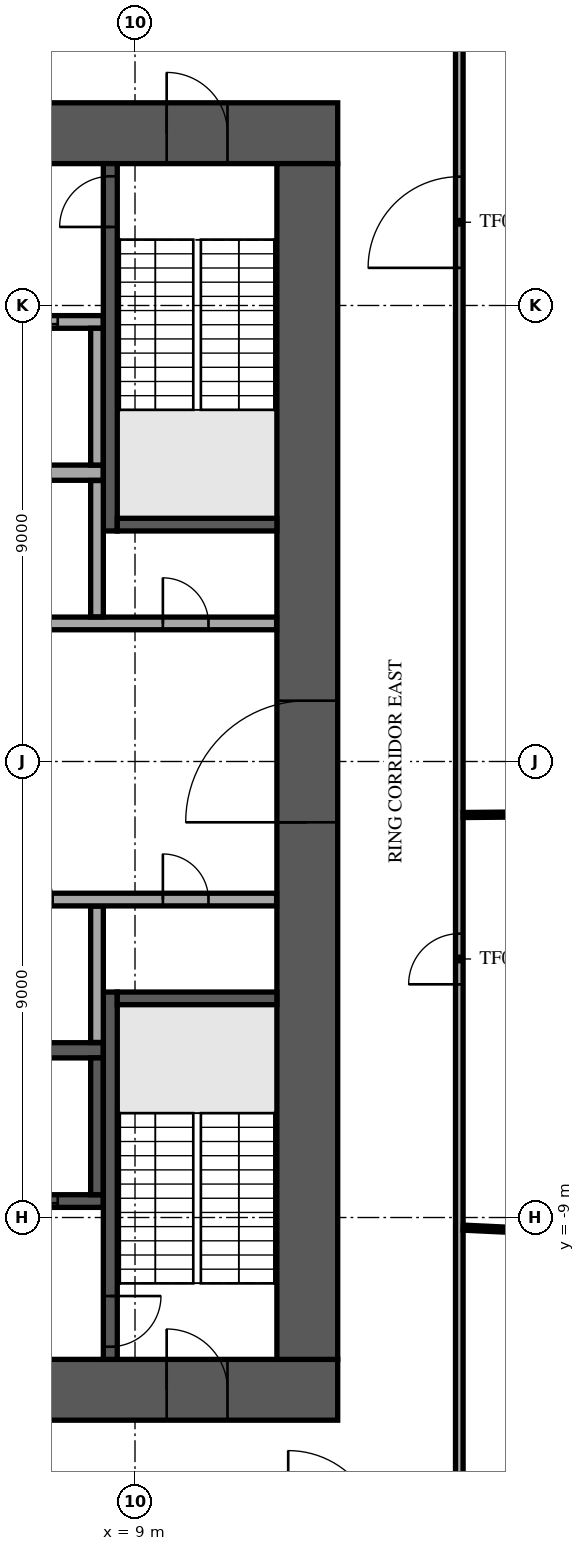
"""IFC4 building model, lengths in metres.
Left out: names, types, materials, properties, quantities, classifications, styles, units other than length and angle.
Written with IfcOpenShell. Run it as: python <this file> out.ifc"""

import sys

from ifc_helpers import new_model, si_unit, direction, frame, frame_2d, origin, place, context, subcontext, project, spatial, rectangle, extrude, element, fill, save


model = new_model("IFC4")
c1 = context("Model", 3, precision=1e-05, world=origin(), true_north=direction((0.0, 1.0)))
c2 = subcontext(c1, "Body", "Model", "MODEL_VIEW")
j1 = project(units=[si_unit("LENGTHUNIT", "METRE"), si_unit("PLANEANGLEUNIT", "RADIAN")], contexts=[c1])
p1 = place(None, origin())
s1 = spatial("IfcSite", under=j1, at=p1, CompositionType="ELEMENT")
p2 = place(p1, origin())
s2 = spatial("IfcBuilding", under=s1, at=p2, CompositionType="ELEMENT")
p3 = place(p2, frame((0.0, 0.0, 27.3)))
s3 = spatial("IfcBuildingStorey", under=s2, at=p3, CompositionType="ELEMENT", Elevation=27.3)
p4 = place(p3, frame((-13.0, 12.4, 0.0), z_axis=(0.0, 0.0, 1.0), x_axis=(1.0, 0.0, 0.0)))
e1 = element("IfcWall", 1, at=p4, inside=s3, PredefinedType="SHEAR", context=c2, shape_type="SweptSolid", body=[
    extrude(rectangle(XDim=26.0, YDim=1.2, at=frame_2d((13.0, 0.0))), origin(), (0.0, 0.0, 1.0), 4.35),
])
p5 = place(p4, frame((11.8, 0.0, 0.0)))
e2 = element("IfcOpeningElement", 2, at=p5, cuts=e1, PredefinedType="OPENING", context=c2, shape_type="SweptSolid", body=[
    extrude(rectangle(XDim=2.4, YDim=2.4, at=frame_2d((1.2, 1.2))), frame((0.0, 0.61, 0.0), z_axis=(0.0, -1.0, 0.0), x_axis=(1.0, 0.0, 0.0)), (0.0, 0.0, 1.0), 1.22),
])
p6 = place(p4, frame((22.625, 0.0, 0.0)))
e3 = element("IfcOpeningElement", 3, at=p6, cuts=e1, PredefinedType="OPENING", context=c2, shape_type="SweptSolid", body=[
    extrude(rectangle(XDim=1.2, YDim=2.1, at=frame_2d((0.6, 1.05))), frame((0.0, 0.61, 0.0), z_axis=(0.0, -1.0, 0.0), x_axis=(1.0, 0.0, 0.0)), (0.0, 0.0, 1.0), 1.22),
])
p7 = place(p4, frame((1.6, 0.0, 0.0)))
e4 = element("IfcOpeningElement", 4, at=p7, cuts=e1, PredefinedType="OPENING", context=c2, shape_type="SweptSolid", body=[
    extrude(rectangle(XDim=1.0, YDim=2.1, at=frame_2d((0.5, 1.05))), frame((0.0, 0.61, 0.0), z_axis=(0.0, -1.0, 0.0), x_axis=(1.0, 0.0, 0.0)), (0.0, 0.0, 1.0), 1.22),
])
p8 = place(p3, frame((-13.0, -12.4, 0.0), z_axis=(0.0, 0.0, 1.0), x_axis=(1.0, 0.0, 0.0)))
e5 = element("IfcWall", 5, at=p8, inside=s3, PredefinedType="SHEAR", context=c2, shape_type="SweptSolid", body=[
    extrude(rectangle(XDim=26.0, YDim=1.2, at=frame_2d((13.0, 0.0))), origin(), (0.0, 0.0, 1.0), 4.35),
])
p9 = place(p8, frame((7.9, 0.0, 0.0)))
e6 = element("IfcOpeningElement", 6, at=p9, cuts=e5, PredefinedType="OPENING", context=c2, shape_type="SweptSolid", body=[
    extrude(rectangle(XDim=2.0, YDim=2.1, at=frame_2d((1.0, 1.05))), frame((0.0, 0.61, 0.0), z_axis=(0.0, -1.0, 0.0), x_axis=(1.0, 0.0, 0.0)), (0.0, 0.0, 1.0), 1.22),
])
p10 = place(p8, frame((18.025, 0.0, 0.0)))
e7 = element("IfcOpeningElement", 7, at=p10, cuts=e5, PredefinedType="OPENING", context=c2, shape_type="SweptSolid", body=[
    extrude(rectangle(XDim=1.2, YDim=2.1, at=frame_2d((0.6, 1.05))), frame((0.0, 0.61, 0.0), z_axis=(0.0, -1.0, 0.0), x_axis=(1.0, 0.0, 0.0)), (0.0, 0.0, 1.0), 1.22),
])
p11 = place(p8, frame((2.175, 0.0, 0.0)))
e8 = element("IfcOpeningElement", 8, at=p11, cuts=e5, PredefinedType="OPENING", context=c2, shape_type="SweptSolid", body=[
    extrude(rectangle(XDim=1.2, YDim=2.1, at=frame_2d((0.6, 1.05))), frame((0.0, 0.61, 0.0), z_axis=(0.0, -1.0, 0.0), x_axis=(1.0, 0.0, 0.0)), (0.0, 0.0, 1.0), 1.22),
])
p12 = place(p8, frame((22.625, 0.0, 0.0)))
e9 = element("IfcOpeningElement", 9, at=p12, cuts=e5, PredefinedType="OPENING", context=c2, shape_type="SweptSolid", body=[
    extrude(rectangle(XDim=1.2, YDim=2.1, at=frame_2d((0.6, 1.05))), frame((0.0, 0.61, 0.0), z_axis=(0.0, -1.0, 0.0), x_axis=(1.0, 0.0, 0.0)), (0.0, 0.0, 1.0), 1.22),
])
p13 = place(p3, frame((12.4, -11.8, 0.0), z_axis=(0.0, 0.0, 1.0), x_axis=(0.0, 1.0, 0.0)))
e10 = element("IfcWall", 10, at=p13, inside=s3, PredefinedType="SHEAR", context=c2, shape_type="SweptSolid", body=[
    extrude(rectangle(XDim=23.6, YDim=1.2, at=frame_2d((11.8, 0.0))), origin(), (0.0, 0.0, 1.0), 4.35),
])
p14 = place(p13, frame((10.6, 0.0, 0.0)))
e11 = element("IfcOpeningElement", 11, at=p14, cuts=e10, PredefinedType="OPENING", context=c2, shape_type="SweptSolid", body=[
    extrude(rectangle(XDim=2.4, YDim=2.4, at=frame_2d((1.2, 1.2))), frame((0.0, 0.61, 0.0), z_axis=(0.0, -1.0, 0.0), x_axis=(1.0, 0.0, 0.0)), (0.0, 0.0, 1.0), 1.22),
])
for number, where, z_axis, x_axis in (
    (12, (-8.375, 5.7, 0.0), (0.0, 0.0, 1.0), (1.0, 0.0, 0.0)),
    (13, (-8.375, -5.7, 0.0), (0.0, 0.0, 1.0), (1.0, 0.0, 0.0)),
):
    element("IfcWall", number, at=place(p3, frame(where, z_axis=z_axis, x_axis=x_axis)), inside=s3, PredefinedType="SOLIDWALL", context=c2, shape_type="SweptSolid", body=[
        extrude(rectangle(XDim=16.75, YDim=0.3, at=frame_2d((8.375, 0.0))), origin(), (0.0, 0.0, 1.0), 4.35),
    ])
p15 = place(p3, frame((-8.375, 8.675, 0.0), z_axis=(0.0, 0.0, 1.0), x_axis=(1.0, 0.0, 0.0)))
e14 = element("IfcWall", 14, at=p15, inside=s3, PredefinedType="SOLIDWALL", context=c2, shape_type="SweptSolid", body=[
    extrude(rectangle(XDim=16.75, YDim=0.25, at=frame_2d((8.375, 0.0))), origin(), (0.0, 0.0, 1.0), 4.35),
])
p16 = place(p15, frame((0.9, 0.0, 0.0)))
e15 = element("IfcOpeningElement", 15, at=p16, cuts=e14, PredefinedType="OPENING", context=c2, shape_type="SweptSolid", body=[
    extrude(rectangle(XDim=1.2, YDim=2.1, at=frame_2d((0.6, 1.05))), frame((0.0, 0.135, 0.0), z_axis=(0.0, -1.0, 0.0), x_axis=(1.0, 0.0, 0.0)), (0.0, 0.0, 1.0), 0.27),
])
p17 = place(p15, frame((3.65, 0.0, 0.0)))
e16 = element("IfcOpeningElement", 16, at=p17, cuts=e14, PredefinedType="OPENING", context=c2, shape_type="SweptSolid", body=[
    extrude(rectangle(XDim=1.2, YDim=2.1, at=frame_2d((0.6, 1.05))), frame((0.0, 0.135, 0.0), z_axis=(0.0, -1.0, 0.0), x_axis=(1.0, 0.0, 0.0)), (0.0, 0.0, 1.0), 0.27),
])
p18 = place(p15, frame((6.4, 0.0, 0.0)))
e17 = element("IfcOpeningElement", 17, at=p18, cuts=e14, PredefinedType="OPENING", context=c2, shape_type="SweptSolid", body=[
    extrude(rectangle(XDim=1.2, YDim=2.1, at=frame_2d((0.6, 1.05))), frame((0.0, 0.135, 0.0), z_axis=(0.0, -1.0, 0.0), x_axis=(1.0, 0.0, 0.0)), (0.0, 0.0, 1.0), 0.27),
])
p19 = place(p15, frame((9.15, 0.0, 0.0)))
e18 = element("IfcOpeningElement", 18, at=p19, cuts=e14, PredefinedType="OPENING", context=c2, shape_type="SweptSolid", body=[
    extrude(rectangle(XDim=1.2, YDim=2.1, at=frame_2d((0.6, 1.05))), frame((0.0, 0.135, 0.0), z_axis=(0.0, -1.0, 0.0), x_axis=(1.0, 0.0, 0.0)), (0.0, 0.0, 1.0), 0.27),
])
p20 = place(p15, frame((11.9, 0.0, 0.0)))
e19 = element("IfcOpeningElement", 19, at=p20, cuts=e14, PredefinedType="OPENING", context=c2, shape_type="SweptSolid", body=[
    extrude(rectangle(XDim=1.2, YDim=2.1, at=frame_2d((0.6, 1.05))), frame((0.0, 0.135, 0.0), z_axis=(0.0, -1.0, 0.0), x_axis=(1.0, 0.0, 0.0)), (0.0, 0.0, 1.0), 0.27),
])
p21 = place(p15, frame((14.65, 0.0, 0.0)))
e20 = element("IfcOpeningElement", 20, at=p21, cuts=e14, PredefinedType="OPENING", context=c2, shape_type="SweptSolid", body=[
    extrude(rectangle(XDim=1.2, YDim=2.1, at=frame_2d((0.6, 1.05))), frame((0.0, 0.135, 0.0), z_axis=(0.0, -1.0, 0.0), x_axis=(1.0, 0.0, 0.0)), (0.0, 0.0, 1.0), 0.27),
])
p22 = place(p3, frame((8.25, 5.85, 0.0), z_axis=(0.0, 0.0, 1.0), x_axis=(0.0, 1.0, 0.0)))
e21 = element("IfcWall", 21, at=p22, inside=s3, PredefinedType="SOLIDWALL", context=c2, shape_type="SweptSolid", body=[
    extrude(rectangle(XDim=2.7, YDim=0.25, at=frame_2d((1.35, 0.0))), origin(), (0.0, 0.0, 1.0), 4.35),
])
p23 = place(p3, frame((-2.875, -8.675, 0.0), z_axis=(0.0, 0.0, 1.0), x_axis=(1.0, 0.0, 0.0)))
e22 = element("IfcWall", 22, at=p23, inside=s3, PredefinedType="SOLIDWALL", context=c2, shape_type="SweptSolid", body=[
    extrude(rectangle(XDim=11.25, YDim=0.25, at=frame_2d((5.625, 0.0))), origin(), (0.0, 0.0, 1.0), 4.35),
])
p24 = place(p23, frame((0.9, 0.0, 0.0)))
e23 = element("IfcOpeningElement", 23, at=p24, cuts=e22, PredefinedType="OPENING", context=c2, shape_type="SweptSolid", body=[
    extrude(rectangle(XDim=1.2, YDim=2.1, at=frame_2d((0.6, 1.05))), frame((0.0, 0.135, 0.0), z_axis=(0.0, -1.0, 0.0), x_axis=(1.0, 0.0, 0.0)), (0.0, 0.0, 1.0), 0.27),
])
p25 = place(p23, frame((3.65, 0.0, 0.0)))
e24 = element("IfcOpeningElement", 24, at=p25, cuts=e22, PredefinedType="OPENING", context=c2, shape_type="SweptSolid", body=[
    extrude(rectangle(XDim=1.2, YDim=2.1, at=frame_2d((0.6, 1.05))), frame((0.0, 0.135, 0.0), z_axis=(0.0, -1.0, 0.0), x_axis=(1.0, 0.0, 0.0)), (0.0, 0.0, 1.0), 0.27),
])
p26 = place(p23, frame((6.4, 0.0, 0.0)))
e25 = element("IfcOpeningElement", 25, at=p26, cuts=e22, PredefinedType="OPENING", context=c2, shape_type="SweptSolid", body=[
    extrude(rectangle(XDim=1.2, YDim=2.1, at=frame_2d((0.6, 1.05))), frame((0.0, 0.135, 0.0), z_axis=(0.0, -1.0, 0.0), x_axis=(1.0, 0.0, 0.0)), (0.0, 0.0, 1.0), 0.27),
])
p27 = place(p23, frame((9.15, 0.0, 0.0)))
e26 = element("IfcOpeningElement", 26, at=p27, cuts=e22, PredefinedType="OPENING", context=c2, shape_type="SweptSolid", body=[
    extrude(rectangle(XDim=1.2, YDim=2.1, at=frame_2d((0.6, 1.05))), frame((0.0, 0.135, 0.0), z_axis=(0.0, -1.0, 0.0), x_axis=(1.0, 0.0, 0.0)), (0.0, 0.0, 1.0), 0.27),
])
p28 = place(p3, frame((8.25, -8.55, 0.0), z_axis=(0.0, 0.0, 1.0), x_axis=(0.0, 1.0, 0.0)))
e27 = element("IfcWall", 27, at=p28, inside=s3, PredefinedType="SOLIDWALL", context=c2, shape_type="SweptSolid", body=[
    extrude(rectangle(XDim=2.7, YDim=0.25, at=frame_2d((1.35, 0.0))), origin(), (0.0, 0.0, 1.0), 4.35),
])
p29 = place(p3, frame((8.512, 4.55, 0.0), z_axis=(0.0, 0.0, 1.0), x_axis=(0.0, 1.0, 0.0)))
e28 = element("IfcWall", 28, at=p29, inside=s3, PredefinedType="SOLIDWALL", context=c2, shape_type="SweptSolid", body=[
    extrude(rectangle(XDim=7.25, YDim=0.275, at=frame_2d((3.625, 0.0))), origin(), (0.0, 0.0, 1.0), 4.35),
])
p30 = place(p29, frame((6.0, 0.0, 0.0)))
e29 = element("IfcOpeningElement", 29, at=p30, cuts=e28, PredefinedType="OPENING", context=c2, shape_type="SweptSolid", body=[
    extrude(rectangle(XDim=1.0, YDim=2.1, at=frame_2d((0.5, 1.05))), frame((0.0, 0.147, 0.0), z_axis=(0.0, -1.0, 0.0), x_axis=(1.0, 0.0, 0.0)), (0.0, 0.0, 1.0), 0.295),
])
p31 = place(p3, frame((8.65, 4.675, 0.0), z_axis=(0.0, 0.0, 1.0), x_axis=(1.0, 0.0, 0.0)))
e30 = element("IfcWall", 30, at=p31, inside=s3, PredefinedType="SOLIDWALL", context=c2, shape_type="SweptSolid", body=[
    extrude(rectangle(XDim=3.15, YDim=0.25, at=frame_2d((1.575, 0.0))), origin(), (0.0, 0.0, 1.0), 4.35),
])
p32 = place(p3, frame((8.512, -4.55, 0.0), z_axis=(0.0, 0.0, 1.0), x_axis=(0.0, -1.0, 0.0)))
e31 = element("IfcWall", 31, at=p32, inside=s3, PredefinedType="SOLIDWALL", context=c2, shape_type="SweptSolid", body=[
    extrude(rectangle(XDim=7.25, YDim=0.275, at=frame_2d((3.625, 0.0))), origin(), (0.0, 0.0, 1.0), 4.35),
])
p33 = place(p32, frame((6.0, 0.0, 0.0)))
e32 = element("IfcOpeningElement", 32, at=p33, cuts=e31, PredefinedType="OPENING", context=c2, shape_type="SweptSolid", body=[
    extrude(rectangle(XDim=1.0, YDim=2.1, at=frame_2d((0.5, 1.05))), frame((0.0, 0.147, 0.0), z_axis=(0.0, -1.0, 0.0), x_axis=(1.0, 0.0, 0.0)), (0.0, 0.0, 1.0), 0.295),
])
p34 = place(p3, frame((8.65, -4.675, 0.0), z_axis=(0.0, 0.0, 1.0), x_axis=(1.0, 0.0, 0.0)))
e33 = element("IfcWall", 33, at=p34, inside=s3, PredefinedType="SOLIDWALL", context=c2, shape_type="SweptSolid", body=[
    extrude(rectangle(XDim=3.15, YDim=0.25, at=frame_2d((1.575, 0.0))), origin(), (0.0, 0.0, 1.0), 4.35),
])
p35 = place(p3, frame((8.25, -5.545, 0.0), z_axis=(0.0, 0.0, 1.0), x_axis=(0.0, 1.0, 0.0)))
e34 = element("IfcWall", 34, at=p35, inside=s3, PredefinedType="PARTITIONING", context=c2, shape_type="SweptSolid", body=[
    extrude(rectangle(XDim=2.69, YDim=0.25, at=frame_2d((1.345, 0.0))), origin(), (0.0, 0.0, 1.0), 4.35),
])
p36 = place(p3, frame((5.63, -2.725, 0.0), z_axis=(0.0, 0.0, 1.0), x_axis=(1.0, 0.0, 0.0)))
e35 = element("IfcWall", 35, at=p36, inside=s3, PredefinedType="PARTITIONING", context=c2, shape_type="SweptSolid", body=[
    extrude(rectangle(XDim=6.165, YDim=0.25, at=frame_2d((3.083, 0.0))), origin(), (0.0, 0.0, 1.0), 4.35),
])
p37 = place(p36, frame((0.745, 0.0, 0.0)))
e36 = element("IfcOpeningElement", 36, at=p37, cuts=e35, PredefinedType="OPENING", context=c2, shape_type="SweptSolid", body=[
    extrude(rectangle(XDim=1.0, YDim=2.1, at=frame_2d((0.5, 1.05))), frame((0.0, 0.135, 0.0), z_axis=(0.0, -1.0, 0.0), x_axis=(1.0, 0.0, 0.0)), (0.0, 0.0, 1.0), 0.27),
])
p38 = place(p36, frame((3.92, 0.0, 0.0)))
e37 = element("IfcOpeningElement", 37, at=p38, cuts=e35, PredefinedType="OPENING", context=c2, shape_type="SweptSolid", body=[
    extrude(rectangle(XDim=0.9, YDim=2.1, at=frame_2d((0.45, 1.05))), frame((0.0, 0.135, 0.0), z_axis=(0.0, -1.0, 0.0), x_axis=(1.0, 0.0, 0.0)), (0.0, 0.0, 1.0), 0.27),
])
p39 = place(p3, frame((-11.795, 2.725, 0.0), z_axis=(0.0, 0.0, 1.0), x_axis=(1.0, 0.0, 0.0)))
e38 = element("IfcWall", 38, at=p39, inside=s3, PredefinedType="PARTITIONING", context=c2, shape_type="SweptSolid", body=[
    extrude(rectangle(XDim=23.59, YDim=0.25, at=frame_2d((11.795, 0.0))), origin(), (0.0, 0.0, 1.0), 4.35),
])
p40 = place(p39, frame((21.345, 0.0, 0.0)))
e39 = element("IfcOpeningElement", 39, at=p40, cuts=e38, PredefinedType="OPENING", context=c2, shape_type="SweptSolid", body=[
    extrude(rectangle(XDim=0.9, YDim=2.1, at=frame_2d((0.45, 1.05))), frame((0.0, 0.135, 0.0), z_axis=(0.0, -1.0, 0.0), x_axis=(1.0, 0.0, 0.0)), (0.0, 0.0, 1.0), 0.27),
])
p41 = place(p39, frame((1.345, 0.0, 0.0)))
e40 = element("IfcOpeningElement", 40, at=p41, cuts=e38, PredefinedType="OPENING", context=c2, shape_type="SweptSolid", body=[
    extrude(rectangle(XDim=0.9, YDim=2.1, at=frame_2d((0.45, 1.05))), frame((0.0, 0.135, 0.0), z_axis=(0.0, -1.0, 0.0), x_axis=(1.0, 0.0, 0.0)), (0.0, 0.0, 1.0), 0.27),
])
p42 = place(p39, frame((4.42, 0.0, 0.0)))
e41 = element("IfcOpeningElement", 41, at=p42, cuts=e38, PredefinedType="OPENING", context=c2, shape_type="SweptSolid", body=[
    extrude(rectangle(XDim=1.0, YDim=2.1, at=frame_2d((0.5, 1.05))), frame((0.0, 0.135, 0.0), z_axis=(0.0, -1.0, 0.0), x_axis=(1.0, 0.0, 0.0)), (0.0, 0.0, 1.0), 0.27),
])
p43 = place(p39, frame((7.17, 0.0, 0.0)))
e42 = element("IfcOpeningElement", 42, at=p43, cuts=e38, PredefinedType="OPENING", context=c2, shape_type="SweptSolid", body=[
    extrude(rectangle(XDim=1.0, YDim=2.1, at=frame_2d((0.5, 1.05))), frame((0.0, 0.135, 0.0), z_axis=(0.0, -1.0, 0.0), x_axis=(1.0, 0.0, 0.0)), (0.0, 0.0, 1.0), 0.27),
])
p44 = place(p39, frame((12.57, 0.0, 0.0)))
e43 = element("IfcOpeningElement", 43, at=p44, cuts=e38, PredefinedType="OPENING", context=c2, shape_type="SweptSolid", body=[
    extrude(rectangle(XDim=1.2, YDim=2.1, at=frame_2d((0.6, 1.05))), frame((0.0, 0.135, 0.0), z_axis=(0.0, -1.0, 0.0), x_axis=(1.0, 0.0, 0.0)), (0.0, 0.0, 1.0), 0.27),
])
p45 = place(p3, frame((8.25, 2.855, 0.0), z_axis=(0.0, 0.0, 1.0), x_axis=(0.0, 1.0, 0.0)))
e44 = element("IfcWall", 44, at=p45, inside=s3, PredefinedType="PARTITIONING", context=c2, shape_type="SweptSolid", body=[
    extrude(rectangle(XDim=2.69, YDim=0.25, at=frame_2d((1.345, 0.0))), origin(), (0.0, 0.0, 1.0), 4.35),
])
p46 = place(p3, frame((15.4, -15.325, 0.0), z_axis=(0.0, 0.0, 1.0), x_axis=(0.0, 1.0, 0.0)))
e45 = element("IfcWall", 45, at=p46, inside=s3, PredefinedType="PARTITIONING", context=c2, shape_type="SweptSolid", body=[
    extrude(rectangle(XDim=30.65, YDim=0.15, at=frame_2d((15.325, 0.0))), origin(), (0.0, 0.0, 1.0), 3.85),
])
p47 = place(p46, frame((25.068, 0.0, 0.0)))
e46 = element("IfcOpeningElement", 46, at=p47, cuts=e45, PredefinedType="OPENING", context=c2, shape_type="SweptSolid", body=[
    extrude(rectangle(XDim=1.8, YDim=2.1, at=frame_2d((0.9, 1.05))), frame((0.0, 0.085, 0.0), z_axis=(0.0, -1.0, 0.0), x_axis=(1.0, 0.0, 0.0)), (0.0, 0.0, 1.0), 0.17),
])
p48 = place(p46, frame((10.927, 0.0, 0.0)))
e47 = element("IfcOpeningElement", 47, at=p48, cuts=e45, PredefinedType="OPENING", context=c2, shape_type="SweptSolid", body=[
    extrude(rectangle(XDim=1.0, YDim=2.1, at=frame_2d((0.5, 1.05))), frame((0.0, 0.085, 0.0), z_axis=(0.0, -1.0, 0.0), x_axis=(1.0, 0.0, 0.0)), (0.0, 0.0, 1.0), 0.17),
])
p49 = place(p3, frame((15.477, -9.2, 0.0), z_axis=(0.0, 0.0, 1.0), x_axis=(0.998880891155, -0.04729656738, 0.0)))
e48 = element("IfcWall", 48, at=p49, inside=s3, PredefinedType="PARTITIONING", context=c2, shape_type="SweptSolid", body=[
    extrude(rectangle(XDim=12.956, YDim=0.1, at=frame_2d((6.478, 0.0))), origin(), (0.0, 0.0, 1.0), 3.85),
])
p50 = place(p3, frame((15.475, -1.056, 0.0), z_axis=(0.0, 0.0, 1.0), x_axis=(0.999960210713, 0.00892059359, 0.0)))
e49 = element("IfcWall", 49, at=p50, inside=s3, PredefinedType="PARTITIONING", context=c2, shape_type="SweptSolid", body=[
    extrude(rectangle(XDim=14.012, YDim=0.1, at=frame_2d((7.006, 0.0))), origin(), (0.0, 0.0, 1.0), 3.55),
])
p51 = place(p6, origin())
e50 = element("IfcDoor", 50, at=p51, inside=s3, OperationType="SINGLE_SWING_LEFT", PredefinedType="DOOR", context=c2, shape_type="SweptSolid", body=[
    extrude(rectangle(XDim=1.2, YDim=2.1, at=frame_2d((0.6, 1.05))), frame((0.0, 0.025, 0.0), z_axis=(0.0, -1.0, 0.0), x_axis=(1.0, 0.0, 0.0)), (0.0, 0.0, 1.0), 0.05),
])
fill(e3, e50)
p52 = place(p12, origin())
e51 = element("IfcDoor", 51, at=p52, inside=s3, OperationType="SINGLE_SWING_LEFT", PredefinedType="DOOR", context=c2, shape_type="SweptSolid", body=[
    extrude(rectangle(XDim=1.2, YDim=2.1, at=frame_2d((0.6, 1.05))), frame((0.0, 0.025, 0.0), z_axis=(0.0, -1.0, 0.0), x_axis=(1.0, 0.0, 0.0)), (0.0, 0.0, 1.0), 0.05),
])
fill(e9, e51)
p53 = place(p14, origin())
e52 = element("IfcDoor", 52, at=p53, inside=s3, OperationType="SINGLE_SWING_LEFT", PredefinedType="DOOR", context=c2, shape_type="SweptSolid", body=[
    extrude(rectangle(XDim=2.4, YDim=2.4, at=frame_2d((1.2, 1.2))), frame((0.0, 0.025, 0.0), z_axis=(0.0, -1.0, 0.0), x_axis=(1.0, 0.0, 0.0)), (0.0, 0.0, 1.0), 0.05),
])
fill(e11, e52)
p54 = place(p21, origin())
e53 = element("IfcDoor", 53, at=p54, inside=s3, OperationType="DOUBLE_DOOR_SLIDING", PredefinedType="DOOR", context=c2, shape_type="SweptSolid", body=[
    extrude(rectangle(XDim=1.2, YDim=2.1, at=frame_2d((0.6, 1.05))), frame((0.0, 0.025, 0.0), z_axis=(0.0, -1.0, 0.0), x_axis=(1.0, 0.0, 0.0)), (0.0, 0.0, 1.0), 0.05),
])
fill(e20, e53)
p55 = place(p27, origin())
e54 = element("IfcDoor", 54, at=p55, inside=s3, OperationType="DOUBLE_DOOR_SLIDING", PredefinedType="DOOR", context=c2, shape_type="SweptSolid", body=[
    extrude(rectangle(XDim=1.2, YDim=2.1, at=frame_2d((0.6, 1.05))), frame((0.0, 0.025, 0.0), z_axis=(0.0, -1.0, 0.0), x_axis=(1.0, 0.0, 0.0)), (0.0, 0.0, 1.0), 0.05),
])
fill(e26, e54)
p56 = place(p30, origin())
e55 = element("IfcDoor", 55, at=p56, inside=s3, OperationType="SINGLE_SWING_LEFT", PredefinedType="DOOR", context=c2, shape_type="SweptSolid", body=[
    extrude(rectangle(XDim=1.0, YDim=2.1, at=frame_2d((0.5, 1.05))), frame((0.0, 0.025, 0.0), z_axis=(0.0, -1.0, 0.0), x_axis=(1.0, 0.0, 0.0)), (0.0, 0.0, 1.0), 0.05),
])
fill(e29, e55)
p57 = place(p33, origin())
e56 = element("IfcDoor", 56, at=p57, inside=s3, OperationType="SINGLE_SWING_LEFT", PredefinedType="DOOR", context=c2, shape_type="SweptSolid", body=[
    extrude(rectangle(XDim=1.0, YDim=2.1, at=frame_2d((0.5, 1.05))), frame((0.0, 0.025, 0.0), z_axis=(0.0, -1.0, 0.0), x_axis=(1.0, 0.0, 0.0)), (0.0, 0.0, 1.0), 0.05),
])
fill(e32, e56)
p58 = place(p40, origin())
e57 = element("IfcDoor", 57, at=p58, inside=s3, OperationType="SINGLE_SWING_LEFT", PredefinedType="DOOR", context=c2, shape_type="SweptSolid", body=[
    extrude(rectangle(XDim=0.9, YDim=2.1, at=frame_2d((0.45, 1.05))), frame((0.0, 0.025, 0.0), z_axis=(0.0, -1.0, 0.0), x_axis=(1.0, 0.0, 0.0)), (0.0, 0.0, 1.0), 0.05),
])
fill(e39, e57)
p59 = place(p38, origin())
e58 = element("IfcDoor", 58, at=p59, inside=s3, OperationType="SINGLE_SWING_LEFT", PredefinedType="DOOR", context=c2, shape_type="SweptSolid", body=[
    extrude(rectangle(XDim=0.9, YDim=2.1, at=frame_2d((0.45, 1.05))), frame((0.0, 0.025, 0.0), z_axis=(0.0, -1.0, 0.0), x_axis=(1.0, 0.0, 0.0)), (0.0, 0.0, 1.0), 0.05),
])
fill(e37, e58)
p60 = place(p47, frame((1.8, 0.0, 0.0), z_axis=(0.0, 0.0, 1.0), x_axis=(-1.0, 0.0, 0.0)))
e59 = element("IfcDoor", 59, at=p60, inside=s3, OperationType="DOUBLE_DOOR_SINGLE_SWING", PredefinedType="DOOR", context=c2, shape_type="SweptSolid", body=[
    extrude(rectangle(XDim=1.8, YDim=2.1, at=frame_2d((0.9, 1.05))), frame((0.0, 0.025, 0.0), z_axis=(0.0, -1.0, 0.0), x_axis=(1.0, 0.0, 0.0)), (0.0, 0.0, 1.0), 0.05),
])
fill(e46, e59)
p61 = place(p48, frame((1.0, 0.0, 0.0), z_axis=(0.0, 0.0, 1.0), x_axis=(-1.0, 0.0, 0.0)))
e60 = element("IfcDoor", 60, at=p61, inside=s3, OperationType="SINGLE_SWING_RIGHT", PredefinedType="DOOR", context=c2, shape_type="SweptSolid", body=[
    extrude(rectangle(XDim=1.0, YDim=2.1, at=frame_2d((0.5, 1.05))), frame((0.0, 0.025, 0.0), z_axis=(0.0, -1.0, 0.0), x_axis=(1.0, 0.0, 0.0)), (0.0, 0.0, 1.0), 0.05),
])
fill(e47, e60)
save(model, sys.argv[1])
